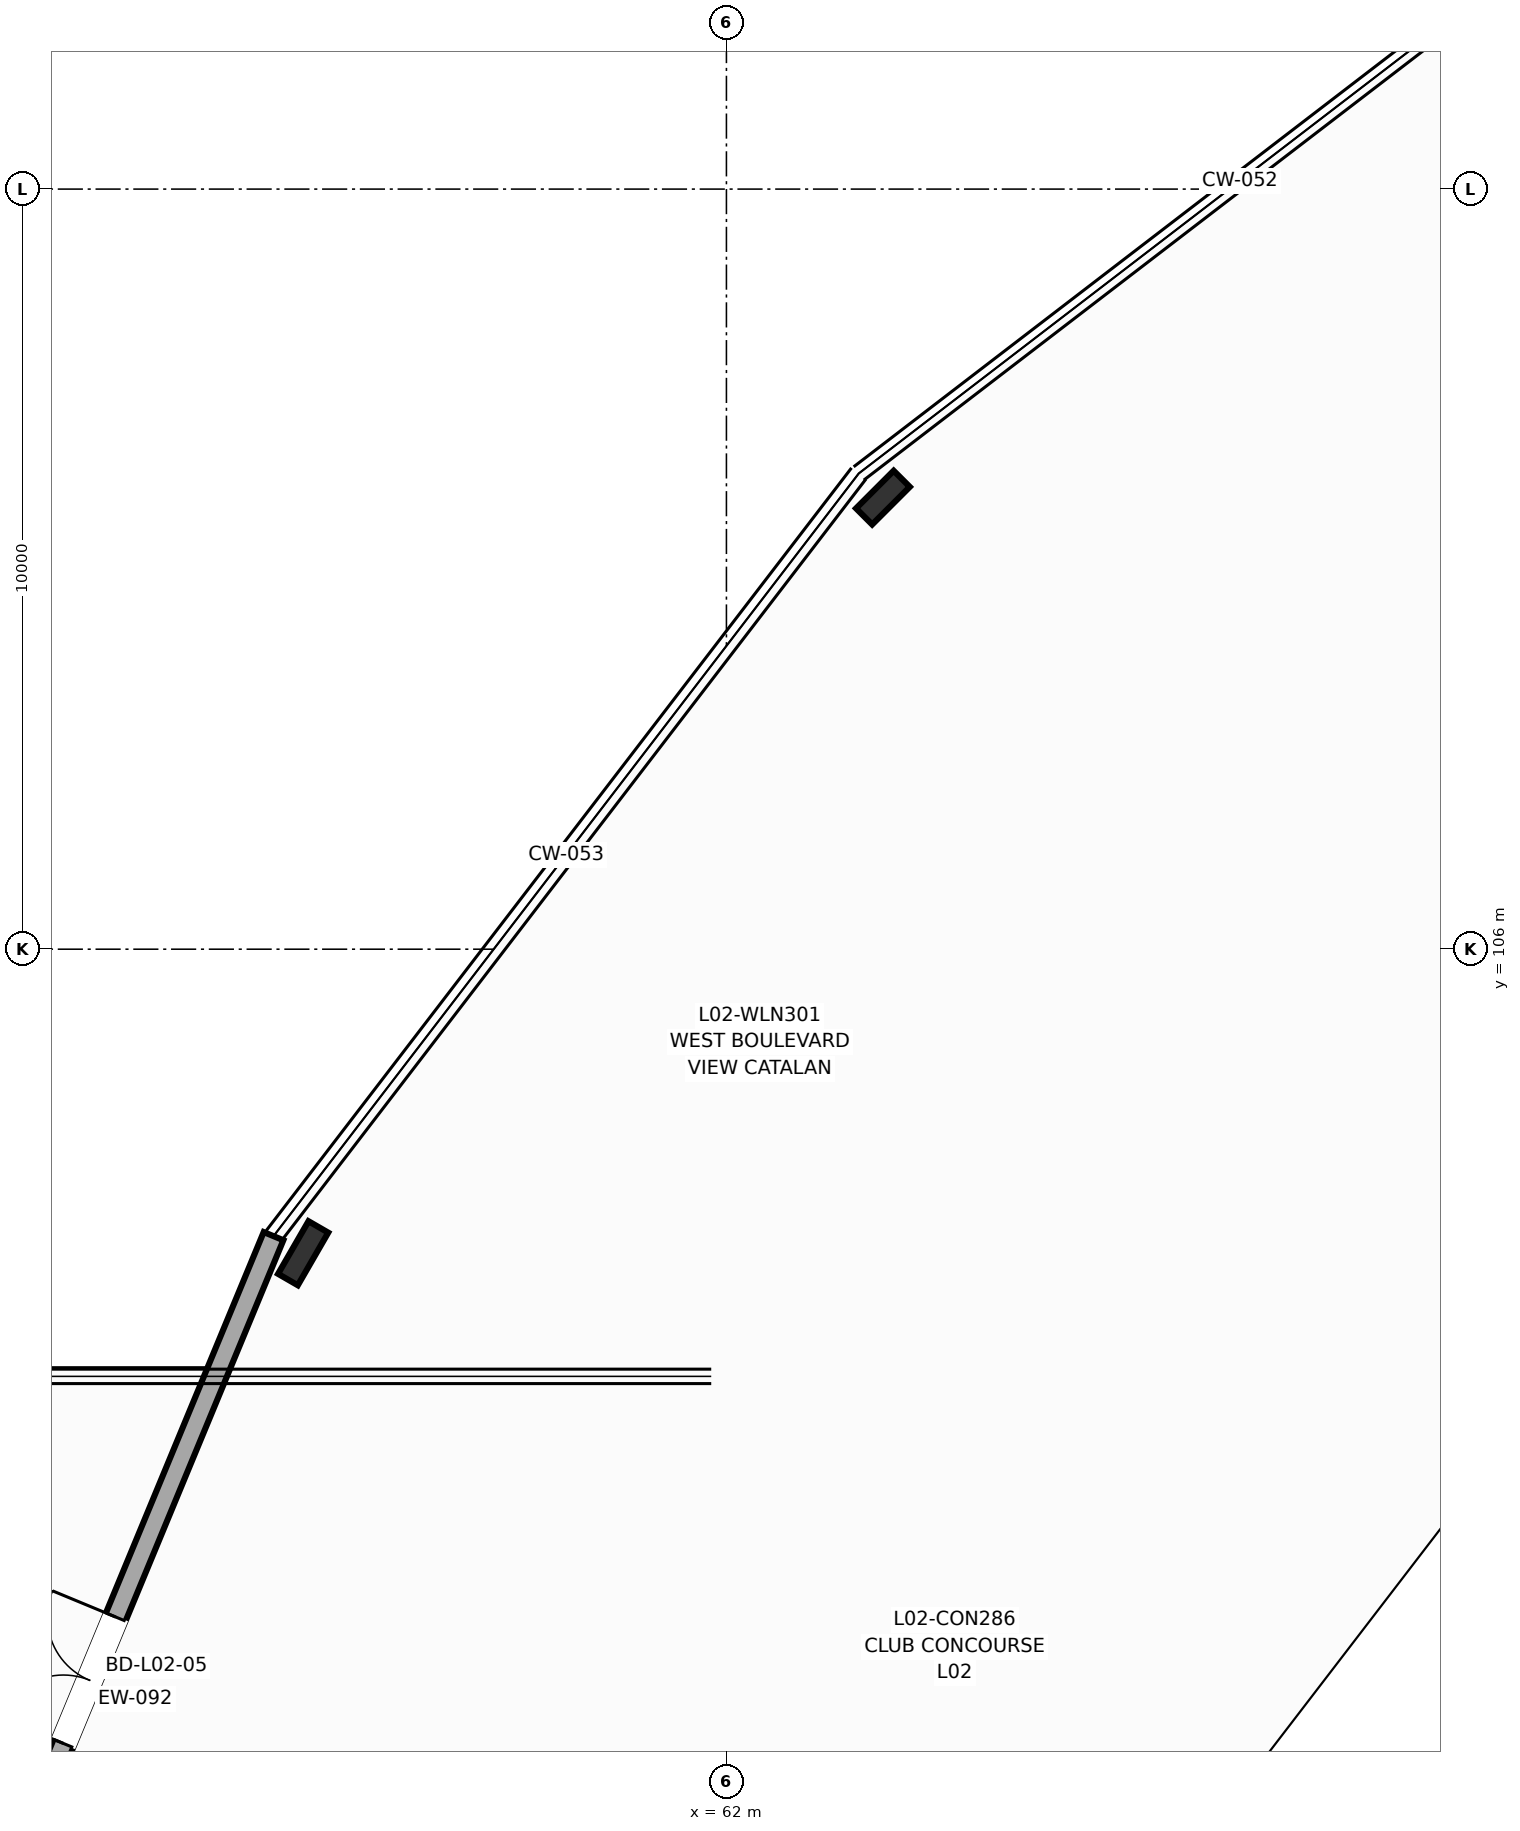
"""IFC4 building model, lengths in metres.
Left out: names, types, materials, properties, quantities, classifications, styles, units other than length and angle.
Written with IfcOpenShell. Run it as: python <this file> out.ifc"""

import sys

from ifc_helpers import new_model, si_unit, direction, frame, frame_2d, origin, origin_2d, place, context, subcontext, project, spatial, rectangle, i_section, extrude, element, fill, save


model = new_model("IFC4")
c1 = context("Model", 3, precision=1e-05, world=origin(), true_north=direction((0.0, 1.0)))
c2 = subcontext(c1, "Body", "Model", "MODEL_VIEW")
j1 = project(units=[si_unit("LENGTHUNIT", "METRE"), si_unit("PLANEANGLEUNIT", "RADIAN")], contexts=[c1])
p1 = place(None, origin())
s1 = spatial("IfcSite", under=j1, at=p1, CompositionType="ELEMENT")
p2 = place(p1, origin())
s2 = spatial("IfcBuilding", under=s1, at=p2, CompositionType="ELEMENT")
p3 = place(p2, frame((0.0, 0.0, 9.0)))
s3 = spatial("IfcBuildingStorey", under=s2, at=p3, CompositionType="ELEMENT", Elevation=9.0)
p4 = place(p3, frame((64.059, 111.941, 0.0), z_axis=(0.0, 0.0, 1.0), x_axis=(-0.707106781187, 0.707106781187, 0.0)))
e1 = element("IfcColumn", 1, at=p4, inside=s3, PredefinedType="COLUMN", context=c2, shape_type="SweptSolid", body=[
    extrude(i_section(OverallWidth=0.3, OverallDepth=0.7, WebThickness=0.017, FlangeThickness=0.032, at=origin_2d()), origin(), (0.0, 0.0, 1.0), 4.5),
])
p5 = place(p3, frame((56.431, 102.0, 0.0), z_axis=(0.0, 0.0, 1.0), x_axis=(-0.866025403784, 0.5, 0.0)))
e2 = element("IfcColumn", 2, at=p5, inside=s3, PredefinedType="COLUMN", context=c2, shape_type="SweptSolid", body=[
    extrude(i_section(OverallWidth=0.3, OverallDepth=0.8, WebThickness=0.018, FlangeThickness=0.033, at=origin_2d()), origin(), (0.0, 0.0, 1.0), 4.5),
])
p6 = place(p3, frame((56.041, 102.225, 0.0), z_axis=(0.0, 0.0, 1.0), x_axis=(-0.382681957383, -0.923880143468, 0.0)))
e3 = element("IfcWall", 3, at=p6, inside=s3, PredefinedType="SOLIDWALL", context=c2, shape_type="SweptSolid", body=[
    extrude(rectangle(XDim=12.648, YDim=0.28, at=frame_2d((6.324, 0.0))), origin(), (0.0, 0.0, 1.0), 3.1),
])
p7 = place(p6, frame((5.424, 0.0, 0.0)))
e4 = element("IfcOpeningElement", 4, at=p7, cuts=e3, PredefinedType="OPENING", context=c2, shape_type="SweptSolid", body=[
    extrude(rectangle(XDim=1.8, YDim=2.35, at=frame_2d((0.9, 1.175))), frame((0.0, 0.15, 0.0), z_axis=(0.0, -1.0, 0.0), x_axis=(1.0, 0.0, 0.0)), (0.0, 0.0, 1.0), 0.3),
])
p8 = place(p3, frame((75.812, 99.571, 0.0), z_axis=(0.0, 0.0, 1.0), x_axis=(-0.608807390719, -0.793318070515, 0.0)))
e5 = element("IfcWall", 5, at=p8, inside=s3, PredefinedType="SOLIDWALL", context=c2, shape_type="SweptSolid", body=[
    extrude(rectangle(XDim=7.213, YDim=0.37, at=frame_2d((3.606, 0.0))), origin(), (0.0, 0.0, 1.0), 3.3),
])
p9 = place(p7, frame((1.8, 0.0, 0.0), z_axis=(0.0, 0.0, 1.0), x_axis=(-1.0, 0.0, 0.0)))
e6 = element("IfcDoor", 6, at=p9, inside=s3, OperationType="DOUBLE_DOOR_SINGLE_SWING", PredefinedType="DOOR", context=c2, shape_type="SweptSolid", body=[
    extrude(rectangle(XDim=1.8, YDim=2.35, at=frame_2d((0.9, 1.175))), frame((0.0, 0.025, 0.0), z_axis=(0.0, -1.0, 0.0), x_axis=(1.0, 0.0, 0.0)), (0.0, 0.0, 1.0), 0.05),
])
fill(e4, e6)
save(model, sys.argv[1])
